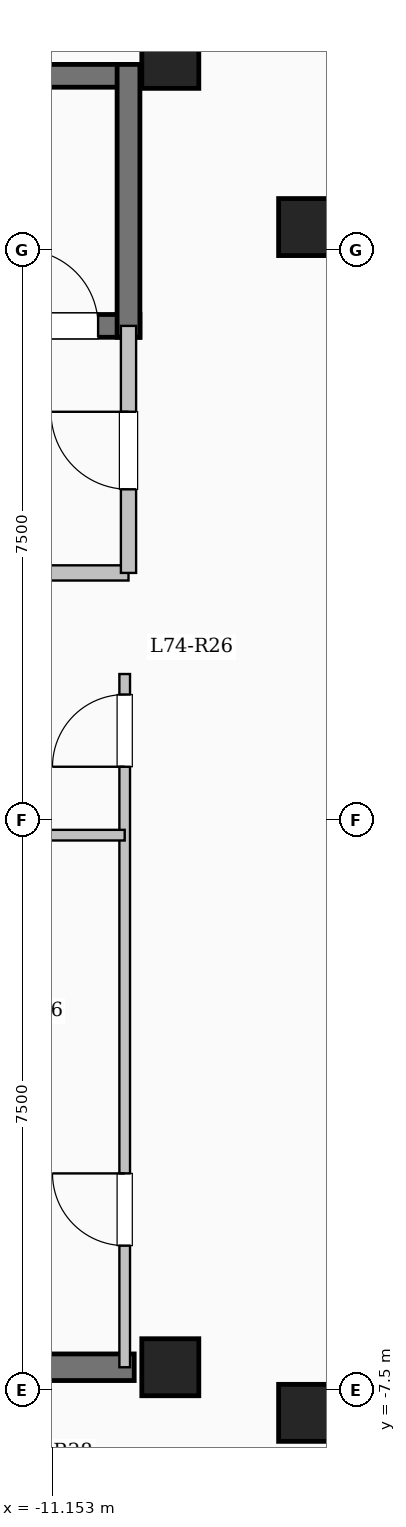
"""IFC4 building model, lengths in metres.
Left out: names, types, materials, properties, quantities, classifications, styles, units other than length and angle.
Written with IfcOpenShell. Run it as: python <this file> out.ifc"""

import sys

from ifc_helpers import new_model, si_unit, direction, frame, frame_2d, origin, origin_2d, place, context, subcontext, project, spatial, rectangle, extrude, element, fill, save


model = new_model("IFC4")
c1 = context("Model", 3, precision=1e-05, world=origin(), true_north=direction((0.0, 1.0)))
c2 = subcontext(c1, "Body", "Model", "MODEL_VIEW")
j1 = project(units=[si_unit("LENGTHUNIT", "METRE"), si_unit("PLANEANGLEUNIT", "RADIAN")], contexts=[c1])
p1 = place(None, origin())
s1 = spatial("IfcSite", under=j1, at=p1, CompositionType="ELEMENT")
p2 = place(p1, origin())
s2 = spatial("IfcBuilding", under=s1, at=p2, CompositionType="ELEMENT")
p3 = place(p2, frame((0.0, 0.0, 271.65)))
s3 = spatial("IfcBuildingStorey", under=s2, at=p3, CompositionType="ELEMENT", Elevation=271.65)
for number, where, z_axis, x_axis in (
    (1, (-7.8, -7.8, 0.0), (0.0, 0.0, 1.0), (1.0, 0.0, 0.0)),
    (2, (-7.8, 7.8, 0.0), (0.0, 0.0, 1.0), (1.0, 0.0, 0.0)),
    (3, (-9.6, -7.2, 0.0), (0.0, 0.0, 1.0), (1.0, 0.0, 0.0)),
    (4, (-9.6, 10.0, 0.0), (0.0, 0.0, 1.0), (1.0, 0.0, 0.0)),
):
    element("IfcColumn", number, at=place(p3, frame(where, z_axis=z_axis, x_axis=x_axis)), inside=s3, PredefinedType="COLUMN", context=c2, shape_type="SweptSolid", body=[
        extrude(rectangle(XDim=0.75, YDim=0.75, at=origin_2d()), origin(), (0.0, 0.0, 1.0), 4.65),
    ])
p4 = place(p3, frame((-18.0, 9.79, 0.0), z_axis=(0.0, 0.0, 1.0), x_axis=(1.0, 0.0, 0.0)))
e5 = element("IfcWall", 5, at=p4, inside=s3, PredefinedType="SHEAR", context=c2, shape_type="SweptSolid", body=[
    extrude(rectangle(XDim=8.0, YDim=0.3, at=frame_2d((4.0, 0.0))), origin(), (0.0, 0.0, 1.0), 4.65),
])
p5 = place(p3, frame((-18.0, 6.5, 0.0), z_axis=(0.0, 0.0, 1.0), x_axis=(1.0, 0.0, 0.0)))
e6 = element("IfcWall", 6, at=p5, inside=s3, PredefinedType="SHEAR", context=c2, shape_type="SweptSolid", body=[
    extrude(rectangle(XDim=8.0, YDim=0.3, at=frame_2d((4.0, 0.0))), origin(), (0.0, 0.0, 1.0), 4.65),
])
p6 = place(p5, frame((6.45, 0.0, 0.0)))
e7 = element("IfcOpeningElement", 7, at=p6, cuts=e6, PredefinedType="OPENING", context=c2, shape_type="SweptSolid", body=[
    extrude(rectangle(XDim=1.0, YDim=2.15, at=frame_2d((0.5, 1.075))), frame((0.0, 0.16, 0.0), z_axis=(0.0, -1.0, 0.0), x_axis=(1.0, 0.0, 0.0)), (0.0, 0.0, 1.0), 0.32),
])
p7 = place(p3, frame((-10.15, 6.35, 0.0), z_axis=(0.0, 0.0, 1.0), x_axis=(0.0, 1.0, 0.0)))
e8 = element("IfcWall", 8, at=p7, inside=s3, PredefinedType="SHEAR", context=c2, shape_type="SweptSolid", body=[
    extrude(rectangle(XDim=3.59, YDim=0.3, at=frame_2d((1.795, 0.0))), origin(), (0.0, 0.0, 1.0), 4.65),
])
p8 = place(p3, frame((-15.55, 3.25, 0.0), z_axis=(0.0, 0.0, 1.0), x_axis=(1.0, 0.0, 0.0)))
e9 = element("IfcWall", 9, at=p8, inside=s3, PredefinedType="SOLIDWALL", context=c2, shape_type="SweptSolid", body=[
    extrude(rectangle(XDim=5.4, YDim=0.2, at=frame_2d((2.7, 0.0))), origin(), (0.0, 0.0, 1.0), 4.35),
])
p9 = place(p3, frame((-10.15, 3.25, 0.0), z_axis=(0.0, 0.0, 1.0), x_axis=(0.0, 1.0, 0.0)))
e10 = element("IfcWall", 10, at=p9, inside=s3, PredefinedType="SOLIDWALL", context=c2, shape_type="SweptSolid", body=[
    extrude(rectangle(XDim=3.25, YDim=0.2, at=frame_2d((1.625, 0.0))), origin(), (0.0, 0.0, 1.0), 4.35),
])
p10 = place(p9, frame((1.1, 0.0, 0.0)))
e11 = element("IfcOpeningElement", 11, at=p10, cuts=e10, PredefinedType="OPENING", context=c2, shape_type="SweptSolid", body=[
    extrude(rectangle(XDim=1.02, YDim=2.15, at=frame_2d((0.51, 1.075))), frame((0.0, 0.11, 0.0), z_axis=(0.0, -1.0, 0.0), x_axis=(1.0, 0.0, 0.0)), (0.0, 0.0, 1.0), 0.22),
])
p11 = place(p3, frame((-18.625, -7.2, 0.0), z_axis=(0.0, 0.0, 1.0), x_axis=(1.0, 0.0, 0.0)))
e12 = element("IfcWall", 12, at=p11, inside=s3, PredefinedType="SHEAR", context=c2, shape_type="SweptSolid", body=[
    extrude(rectangle(XDim=8.55, YDim=0.35, at=frame_2d((4.275, 0.0))), origin(), (0.0, 0.0, 1.0), 4.65),
])
p12 = place(p11, frame((1.725, 0.0, 0.0)))
e13 = element("IfcOpeningElement", 13, at=p12, cuts=e12, PredefinedType="OPENING", context=c2, shape_type="SweptSolid", body=[
    extrude(rectangle(XDim=1.12, YDim=2.15, at=frame_2d((0.56, 1.075))), frame((0.0, 0.185, 0.0), z_axis=(0.0, -1.0, 0.0), x_axis=(1.0, 0.0, 0.0)), (0.0, 0.0, 1.0), 0.37),
])
p13 = place(p3, frame((-10.2, -7.2, 0.0), z_axis=(0.0, 0.0, 1.0), x_axis=(0.0, 1.0, 0.0)))
e14 = element("IfcWall", 14, at=p13, inside=s3, PredefinedType="PARTITIONING", context=c2, shape_type="SweptSolid", body=[
    extrude(rectangle(XDim=9.12, YDim=0.14, at=frame_2d((4.56, 0.0))), origin(), (0.0, 0.0, 1.0), 4.35),
])
p14 = place(p13, frame((1.6, 0.0, 0.0)))
e15 = element("IfcOpeningElement", 15, at=p14, cuts=e14, PredefinedType="OPENING", context=c2, shape_type="SweptSolid", body=[
    extrude(rectangle(XDim=0.95, YDim=2.12, at=frame_2d((0.475, 1.06))), frame((0.0, 0.08, 0.0), z_axis=(0.0, -1.0, 0.0), x_axis=(1.0, 0.0, 0.0)), (0.0, 0.0, 1.0), 0.16),
])
p15 = place(p13, frame((7.9, 0.0, 0.0)))
e16 = element("IfcOpeningElement", 16, at=p15, cuts=e14, PredefinedType="OPENING", context=c2, shape_type="SweptSolid", body=[
    extrude(rectangle(XDim=0.95, YDim=2.12, at=frame_2d((0.475, 1.06))), frame((0.0, 0.08, 0.0), z_axis=(0.0, -1.0, 0.0), x_axis=(1.0, 0.0, 0.0)), (0.0, 0.0, 1.0), 0.16),
])
p16 = place(p3, frame((-12.9, -0.2, 0.0), z_axis=(0.0, 0.0, 1.0), x_axis=(1.0, 0.0, 0.0)))
e17 = element("IfcWall", 17, at=p16, inside=s3, PredefinedType="PARTITIONING", context=c2, shape_type="SweptSolid", body=[
    extrude(rectangle(XDim=2.7, YDim=0.14, at=frame_2d((1.35, 0.0))), origin(), (0.0, 0.0, 1.0), 4.35),
])
p17 = place(p6, origin())
e18 = element("IfcDoor", 18, at=p17, inside=s3, OperationType="SINGLE_SWING_LEFT", PredefinedType="DOOR", context=c2, shape_type="SweptSolid", body=[
    extrude(rectangle(XDim=1.0, YDim=2.15, at=frame_2d((0.5, 1.075))), frame((0.0, 0.025, 0.0), z_axis=(0.0, -1.0, 0.0), x_axis=(1.0, 0.0, 0.0)), (0.0, 0.0, 1.0), 0.05),
])
fill(e7, e18)
p18 = place(p10, origin())
e19 = element("IfcDoor", 19, at=p18, inside=s3, OperationType="SINGLE_SWING_RIGHT", PredefinedType="DOOR", context=c2, shape_type="SweptSolid", body=[
    extrude(rectangle(XDim=1.02, YDim=2.15, at=frame_2d((0.51, 1.075))), frame((0.0, 0.025, 0.0), z_axis=(0.0, -1.0, 0.0), x_axis=(1.0, 0.0, 0.0)), (0.0, 0.0, 1.0), 0.05),
])
fill(e11, e19)
p19 = place(p14, origin())
e20 = element("IfcDoor", 20, at=p19, inside=s3, OperationType="SINGLE_SWING_RIGHT", PredefinedType="DOOR", context=c2, shape_type="SweptSolid", body=[
    extrude(rectangle(XDim=0.95, YDim=2.12, at=frame_2d((0.475, 1.06))), frame((0.0, 0.025, 0.0), z_axis=(0.0, -1.0, 0.0), x_axis=(1.0, 0.0, 0.0)), (0.0, 0.0, 1.0), 0.05),
])
fill(e15, e20)
p20 = place(p15, origin())
e21 = element("IfcDoor", 21, at=p20, inside=s3, OperationType="SINGLE_SWING_LEFT", PredefinedType="DOOR", context=c2, shape_type="SweptSolid", body=[
    extrude(rectangle(XDim=0.95, YDim=2.12, at=frame_2d((0.475, 1.06))), frame((0.0, 0.025, 0.0), z_axis=(0.0, -1.0, 0.0), x_axis=(1.0, 0.0, 0.0)), (0.0, 0.0, 1.0), 0.05),
])
fill(e16, e21)
save(model, sys.argv[1])
